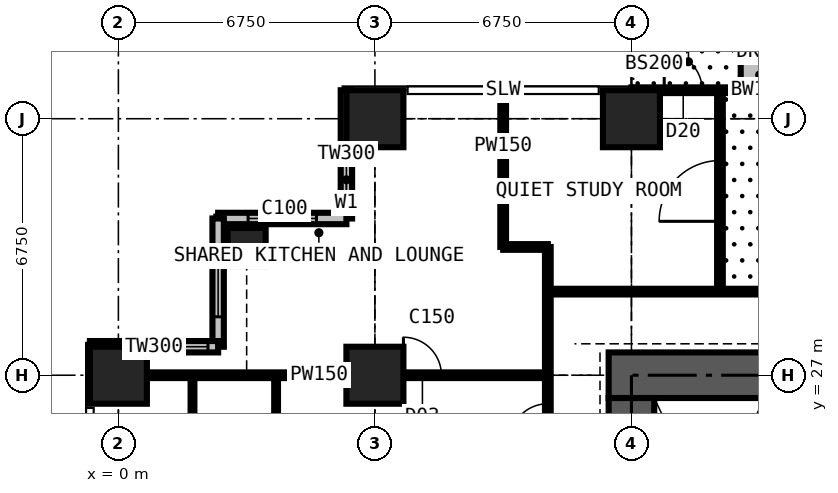
"""IFC4 building model, lengths in metres.
Left out: names, types, materials, properties, quantities, classifications, styles, units other than length and angle.
Written with IfcOpenShell. Run it as: python <this file> out.ifc"""

import sys

from ifc_helpers import new_model, si_unit, direction, frame, frame_2d, origin, origin_2d, place, context, subcontext, project, spatial, rectangle, extrude, element, fill, save


model = new_model("IFC4")
c1 = context("Model", 3, precision=1e-05, world=origin(), true_north=direction((0.0, 1.0)))
c2 = subcontext(c1, "Body", "Model", "MODEL_VIEW")
j1 = project(units=[si_unit("LENGTHUNIT", "METRE"), si_unit("PLANEANGLEUNIT", "RADIAN")], contexts=[c1])
p1 = place(None, origin())
s1 = spatial("IfcSite", under=j1, at=p1, CompositionType="ELEMENT")
p2 = place(p1, origin())
s2 = spatial("IfcBuilding", under=s1, at=p2, CompositionType="ELEMENT")
p3 = place(p2, frame((0.0, 0.0, 108.9)))
s3 = spatial("IfcBuildingStorey", under=s2, at=p3, CompositionType="ELEMENT", Elevation=108.9)
p4 = place(p3, frame((0.0, 27.0, 0.0), z_axis=(0.0, 0.0, 1.0), x_axis=(1.0, 0.0, 0.0)))
e1 = element("IfcColumn", 1, at=p4, inside=s3, PredefinedType="COLUMN", context=c2, shape_type="SweptSolid", body=[
    extrude(rectangle(XDim=1.5, YDim=1.5, at=origin_2d()), origin(), (0.0, 0.0, 1.0), 3.6),
])
p5 = place(p3, frame((3.375, 30.375, 0.0), z_axis=(0.0, 0.0, 1.0), x_axis=(1.0, 0.0, 0.0)))
e2 = element("IfcColumn", 2, at=p5, inside=s3, PredefinedType="COLUMN", context=c2, shape_type="SweptSolid", body=[
    extrude(rectangle(XDim=1.0, YDim=1.0, at=origin_2d()), origin(), (0.0, 0.0, 1.0), 3.6),
])
for number, where, z_axis, x_axis in (
    (3, (6.75, 27.0, 0.0), (0.0, 0.0, 1.0), (1.0, 0.0, 0.0)),
    (4, (6.75, 33.75, 0.0), (0.0, 0.0, 1.0), (1.0, 0.0, 0.0)),
    (5, (13.5, 33.75, 0.0), (0.0, 0.0, 1.0), (1.0, 0.0, 0.0)),
):
    element("IfcColumn", number, at=place(p3, frame(where, z_axis=z_axis, x_axis=x_axis)), inside=s3, PredefinedType="COLUMN", context=c2, shape_type="SweptSolid", body=[
        extrude(rectangle(XDim=1.5, YDim=1.5, at=origin_2d()), origin(), (0.0, 0.0, 1.0), 3.6),
    ])
p6 = place(p3, frame((27.6, 27.0, 0.0), z_axis=(0.0, 0.0, 1.0), x_axis=(-1.0, 0.0, 0.0)))
e6 = element("IfcWall", 6, at=p6, inside=s3, PredefinedType="SHEAR", context=c2, shape_type="SweptSolid", body=[
    extrude(rectangle(XDim=14.7, YDim=1.2, at=frame_2d((7.35, 0.0))), origin(), (0.0, 0.0, 1.0), 3.6),
])
p7 = place(p6, frame((4.55, 0.0, 0.0)))
e7 = element("IfcOpeningElement", 7, at=p7, cuts=e6, PredefinedType="OPENING", context=c2, shape_type="SweptSolid", body=[
    extrude(rectangle(XDim=0.9, YDim=2.2, at=frame_2d((0.45, 1.1))), frame((0.0, 0.61, 0.0), z_axis=(0.0, -1.0, 0.0), x_axis=(1.0, 0.0, 0.0)), (0.0, 0.0, 1.0), 1.22),
])
p8 = place(p6, frame((7.525, 0.0, 0.0)))
e8 = element("IfcOpeningElement", 8, at=p8, cuts=e6, PredefinedType="OPENING", context=c2, shape_type="SweptSolid", body=[
    extrude(rectangle(XDim=1.0, YDim=2.2, at=frame_2d((0.5, 1.1))), frame((0.0, 0.61, 0.0), z_axis=(0.0, -1.0, 0.0), x_axis=(1.0, 0.0, 0.0)), (0.0, 0.0, 1.0), 1.22),
])
p9 = place(p3, frame((13.5, 26.4, 0.0), z_axis=(0.0, 0.0, 1.0), x_axis=(0.0, -1.0, 0.0)))
e9 = element("IfcWall", 9, at=p9, inside=s3, PredefinedType="SHEAR", context=c2, shape_type="SweptSolid", body=[
    extrude(rectangle(XDim=12.3, YDim=1.2, at=frame_2d((6.15, 0.0))), origin(), (0.0, 0.0, 1.0), 3.6),
])
p10 = place(p9, frame((7.45, 0.0, 0.0)))
e10 = element("IfcOpeningElement", 10, at=p10, cuts=e9, PredefinedType="OPENING", context=c2, shape_type="SweptSolid", body=[
    extrude(rectangle(XDim=1.2, YDim=2.2, at=frame_2d((0.6, 1.1))), frame((0.0, 0.61, 0.0), z_axis=(0.0, -1.0, 0.0), x_axis=(1.0, 0.0, 0.0)), (0.0, 0.0, 1.0), 1.22),
])
p11 = place(p3, frame((13.5, 34.5, 0.0), z_axis=(0.0, 0.0, 1.0), x_axis=(1.0, 0.0, 0.0)))
e11 = element("IfcWall", 11, at=p11, inside=s3, PredefinedType="SOLIDWALL", context=c2, shape_type="SweptSolid", body=[
    extrude(rectangle(XDim=6.75, YDim=0.15, at=frame_2d((3.375, 0.0))), origin(), (0.0, 0.0, 1.0), 3.375),
])
p12 = place(p11, frame((0.863, 0.0, 0.0)))
e12 = element("IfcOpeningElement", 12, at=p12, cuts=e11, PredefinedType="OPENING", context=c2, shape_type="SweptSolid", body=[
    extrude(rectangle(XDim=1.0, YDim=2.2, at=frame_2d((0.5, 1.1))), frame((0.0, 0.085, 0.0), z_axis=(0.0, -1.0, 0.0), x_axis=(1.0, 0.0, 0.0)), (0.0, 0.0, 1.0), 0.17),
])
p13 = place(p11, frame((2.512, 0.0, 0.9)))
e13 = element("IfcOpeningElement", 13, at=p13, cuts=e11, PredefinedType="OPENING", context=c2, shape_type="SweptSolid", body=[
    extrude(rectangle(XDim=0.9, YDim=1.8, at=frame_2d((0.45, 0.9))), frame((0.0, 0.085, 0.0), z_axis=(0.0, -1.0, 0.0), x_axis=(1.0, 0.0, 0.0)), (0.0, 0.0, 1.0), 0.17),
])
p14 = place(p11, frame((4.887, 0.0, 0.0)))
e14 = element("IfcOpeningElement", 14, at=p14, cuts=e11, PredefinedType="OPENING", context=c2, shape_type="SweptSolid", body=[
    extrude(rectangle(XDim=1.0, YDim=2.2, at=frame_2d((0.5, 1.1))), frame((0.0, 0.085, 0.0), z_axis=(0.0, -1.0, 0.0), x_axis=(1.0, 0.0, 0.0)), (0.0, 0.0, 1.0), 0.17),
])
p15 = place(p11, frame((3.575, 0.0, 0.9)))
e15 = element("IfcOpeningElement", 15, at=p15, cuts=e11, PredefinedType="OPENING", context=c2, shape_type="SweptSolid", body=[
    extrude(rectangle(XDim=1.2, YDim=1.8, at=frame_2d((0.6, 0.9))), frame((0.0, 0.085, 0.0), z_axis=(0.0, -1.0, 0.0), x_axis=(1.0, 0.0, 0.0)), (0.0, 0.0, 1.0), 0.17),
])
p16 = place(p3, frame((6.0, 34.5, 0.0), z_axis=(0.0, 0.0, 1.0), x_axis=(0.0, -1.0, 0.0)))
e16 = element("IfcWall", 16, at=p16, inside=s3, PredefinedType="SOLIDWALL", context=c2, shape_type="SweptSolid", body=[
    extrude(rectangle(XDim=3.375, YDim=0.3, at=frame_2d((1.688, 0.0))), origin(), (0.0, 0.0, 1.0), 3.375),
])
p17 = place(p16, frame((1.607, 0.0, 0.9)))
e17 = element("IfcOpeningElement", 17, at=p17, cuts=e16, PredefinedType="OPENING", context=c2, shape_type="SweptSolid", body=[
    extrude(rectangle(XDim=1.5, YDim=1.8, at=frame_2d((0.75, 0.9))), frame((0.0, 0.16, 0.0), z_axis=(0.0, -1.0, 0.0), x_axis=(1.0, 0.0, 0.0)), (0.0, 0.0, 1.0), 0.32),
])
p18 = place(p3, frame((6.0, 31.125, 0.0), z_axis=(0.0, 0.0, 1.0), x_axis=(-1.0, 0.0, 0.0)))
e18 = element("IfcWall", 18, at=p18, inside=s3, PredefinedType="SOLIDWALL", context=c2, shape_type="SweptSolid", body=[
    extrude(rectangle(XDim=3.375, YDim=0.3, at=frame_2d((1.688, 0.0))), origin(), (0.0, 0.0, 1.0), 3.375),
])
p19 = place(p18, frame((0.788, 0.0, 0.6)))
e19 = element("IfcOpeningElement", 19, at=p19, cuts=e18, PredefinedType="OPENING", context=c2, shape_type="SweptSolid", body=[
    extrude(rectangle(XDim=1.8, YDim=2.1, at=frame_2d((0.9, 1.05))), frame((0.0, 0.16, 0.0), z_axis=(0.0, -1.0, 0.0), x_axis=(1.0, 0.0, 0.0)), (0.0, 0.0, 1.0), 0.32),
])
p20 = place(p3, frame((2.625, 31.125, 0.0), z_axis=(0.0, 0.0, 1.0), x_axis=(0.0, -1.0, 0.0)))
e20 = element("IfcWall", 20, at=p20, inside=s3, PredefinedType="SOLIDWALL", context=c2, shape_type="SweptSolid", body=[
    extrude(rectangle(XDim=3.375, YDim=0.3, at=frame_2d((1.688, 0.0))), origin(), (0.0, 0.0, 1.0), 3.375),
])
p21 = place(p20, frame((0.788, 0.0, 0.6)))
e21 = element("IfcOpeningElement", 21, at=p21, cuts=e20, PredefinedType="OPENING", context=c2, shape_type="SweptSolid", body=[
    extrude(rectangle(XDim=1.8, YDim=2.1, at=frame_2d((0.9, 1.05))), frame((0.0, 0.16, 0.0), z_axis=(0.0, -1.0, 0.0), x_axis=(1.0, 0.0, 0.0)), (0.0, 0.0, 1.0), 0.32),
])
p22 = place(p3, frame((2.625, 27.75, 0.0), z_axis=(0.0, 0.0, 1.0), x_axis=(-1.0, 0.0, 0.0)))
e22 = element("IfcWall", 22, at=p22, inside=s3, PredefinedType="SOLIDWALL", context=c2, shape_type="SweptSolid", body=[
    extrude(rectangle(XDim=3.375, YDim=0.3, at=frame_2d((1.688, 0.0))), origin(), (0.0, 0.0, 1.0), 3.375),
])
p23 = place(p22, frame((0.268, 0.0, 0.9)))
e23 = element("IfcOpeningElement", 23, at=p23, cuts=e22, PredefinedType="OPENING", context=c2, shape_type="SweptSolid", body=[
    extrude(rectangle(XDim=1.5, YDim=1.8, at=frame_2d((0.75, 0.9))), frame((0.0, 0.16, 0.0), z_axis=(0.0, -1.0, 0.0), x_axis=(1.0, 0.0, 0.0)), (0.0, 0.0, 1.0), 0.32),
])
p24 = place(p3, frame((16.875, 34.6, 0.0), z_axis=(0.0, 0.0, 1.0), x_axis=(0.0, 1.0, 0.0)))
e24 = element("IfcWall", 24, at=p24, inside=s3, PredefinedType="USERDEFINED", context=c2, shape_type="SweptSolid", body=[
    extrude(rectangle(XDim=2.2, YDim=1.0, at=frame_2d((1.1, 0.0))), origin(), (0.0, 0.0, 1.0), 0.9),
])
p25 = place(p3, frame((-0.734, 27.0, 0.0), z_axis=(0.0, 0.0, 1.0), x_axis=(1.0, 0.0, 0.0)))
e25 = element("IfcWall", 25, at=p25, inside=s3, PredefinedType="PARTITIONING", context=c2, shape_type="SweptSolid", body=[
    extrude(rectangle(XDim=12.034, YDim=0.15, at=frame_2d((6.017, 0.0))), origin(), (0.0, 0.0, 1.0), 2.806),
])
p26 = place(p25, frame((8.234, 0.0, 0.0)))
e26 = element("IfcOpeningElement", 26, at=p26, cuts=e25, PredefinedType="OPENING", context=c2, shape_type="SweptSolid", body=[
    extrude(rectangle(XDim=1.0, YDim=2.2, at=frame_2d((0.5, 1.1))), frame((0.0, 0.085, 0.0), z_axis=(0.0, -1.0, 0.0), x_axis=(1.0, 0.0, 0.0)), (0.0, 0.0, 1.0), 0.17),
])
p27 = place(p3, frame((1.95, 25.0, 0.0), z_axis=(0.0, 0.0, 1.0), x_axis=(0.0, 1.0, 0.0)))
e27 = element("IfcWall", 27, at=p27, inside=s3, PredefinedType="PARTITIONING", context=c2, shape_type="SweptSolid", body=[
    extrude(rectangle(XDim=2.0, YDim=0.1, at=frame_2d((1.0, 0.0))), origin(), (0.0, 0.0, 1.0), 3.375),
])
p28 = place(p3, frame((4.15, 10.125, 0.0), z_axis=(0.0, 0.0, 1.0), x_axis=(0.0, 1.0, 0.0)))
e28 = element("IfcWall", 28, at=p28, inside=s3, PredefinedType="PARTITIONING", context=c2, shape_type="SweptSolid", body=[
    extrude(rectangle(XDim=16.875, YDim=0.1, at=frame_2d((8.438, 0.0))), origin(), (0.0, 0.0, 1.0), 3.375),
])
p29 = place(p28, frame((0.2, 0.0, 0.0)))
e29 = element("IfcOpeningElement", 29, at=p29, cuts=e28, PredefinedType="OPENING", context=c2, shape_type="SweptSolid", body=[
    extrude(rectangle(XDim=0.95, YDim=2.2, at=frame_2d((0.475, 1.1))), frame((0.0, 0.06, 0.0), z_axis=(0.0, -1.0, 0.0), x_axis=(1.0, 0.0, 0.0)), (0.0, 0.0, 1.0), 0.12),
])
p30 = place(p28, frame((3.625, 0.0, 0.0)))
e30 = element("IfcOpeningElement", 30, at=p30, cuts=e28, PredefinedType="OPENING", context=c2, shape_type="SweptSolid", body=[
    extrude(rectangle(XDim=0.95, YDim=2.2, at=frame_2d((0.475, 1.1))), frame((0.0, 0.06, 0.0), z_axis=(0.0, -1.0, 0.0), x_axis=(1.0, 0.0, 0.0)), (0.0, 0.0, 1.0), 0.12),
])
p31 = place(p28, frame((7.0, 0.0, 0.0)))
e31 = element("IfcOpeningElement", 31, at=p31, cuts=e28, PredefinedType="OPENING", context=c2, shape_type="SweptSolid", body=[
    extrude(rectangle(XDim=0.95, YDim=2.2, at=frame_2d((0.475, 1.1))), frame((0.0, 0.06, 0.0), z_axis=(0.0, -1.0, 0.0), x_axis=(1.0, 0.0, 0.0)), (0.0, 0.0, 1.0), 0.12),
])
p32 = place(p28, frame((10.375, 0.0, 0.0)))
e32 = element("IfcOpeningElement", 32, at=p32, cuts=e28, PredefinedType="OPENING", context=c2, shape_type="SweptSolid", body=[
    extrude(rectangle(XDim=0.95, YDim=2.2, at=frame_2d((0.475, 1.1))), frame((0.0, 0.06, 0.0), z_axis=(0.0, -1.0, 0.0), x_axis=(1.0, 0.0, 0.0)), (0.0, 0.0, 1.0), 0.12),
])
p33 = place(p28, frame((13.75, 0.0, 0.0)))
e33 = element("IfcOpeningElement", 33, at=p33, cuts=e28, PredefinedType="OPENING", context=c2, shape_type="SweptSolid", body=[
    extrude(rectangle(XDim=0.95, YDim=2.2, at=frame_2d((0.475, 1.1))), frame((0.0, 0.06, 0.0), z_axis=(0.0, -1.0, 0.0), x_axis=(1.0, 0.0, 0.0)), (0.0, 0.0, 1.0), 0.12),
])
p34 = place(p3, frame((10.125, 30.375, 0.0), z_axis=(0.0, 0.0, 1.0), x_axis=(0.0, 1.0, 0.0)))
e34 = element("IfcWall", 34, at=p34, inside=s3, PredefinedType="PARTITIONING", context=c2, shape_type="SweptSolid", body=[
    extrude(rectangle(XDim=4.109, YDim=0.15, at=frame_2d((2.054, 0.0))), origin(), (0.0, 0.0, 1.0), 3.375),
])
p35 = place(p3, frame((10.125, 30.375, 0.0), z_axis=(0.0, 0.0, 1.0), x_axis=(1.0, 0.0, 0.0)))
e35 = element("IfcWall", 35, at=p35, inside=s3, PredefinedType="PARTITIONING", context=c2, shape_type="SweptSolid", body=[
    extrude(rectangle(XDim=1.175, YDim=0.15, at=frame_2d((0.587, 0.0))), origin(), (0.0, 0.0, 1.0), 3.375),
])
p36 = place(p3, frame((11.3, 11.3, 0.0), z_axis=(0.0, 0.0, 1.0), x_axis=(0.0, 1.0, 0.0)))
e36 = element("IfcWall", 36, at=p36, inside=s3, PredefinedType="PARTITIONING", context=c2, shape_type="SweptSolid", body=[
    extrude(rectangle(XDim=19.075, YDim=0.15, at=frame_2d((9.538, 0.0))), origin(), (0.0, 0.0, 1.0), 3.375),
])
p37 = place(p36, frame((13.95, 0.0, 0.0)))
e37 = element("IfcOpeningElement", 37, at=p37, cuts=e36, PredefinedType="OPENING", context=c2, shape_type="SweptSolid", body=[
    extrude(rectangle(XDim=1.0, YDim=2.2, at=frame_2d((0.5, 1.1))), frame((0.0, 0.085, 0.0), z_axis=(0.0, -1.0, 0.0), x_axis=(1.0, 0.0, 0.0)), (0.0, 0.0, 1.0), 0.17),
])
p38 = place(p3, frame((11.3, 29.2, 0.0), z_axis=(0.0, 0.0, 1.0), x_axis=(1.0, 0.0, 0.0)))
e38 = element("IfcWall", 38, at=p38, inside=s3, PredefinedType="PARTITIONING", context=c2, shape_type="SweptSolid", body=[
    extrude(rectangle(XDim=19.075, YDim=0.15, at=frame_2d((9.538, 0.0))), origin(), (0.0, 0.0, 1.0), 3.375),
])
p39 = place(p38, frame((14.25, 0.0, 0.0)))
e39 = element("IfcOpeningElement", 39, at=p39, cuts=e38, PredefinedType="OPENING", context=c2, shape_type="SweptSolid", body=[
    extrude(rectangle(XDim=1.0, YDim=2.2, at=frame_2d((0.5, 1.1))), frame((0.0, 0.085, 0.0), z_axis=(0.0, -1.0, 0.0), x_axis=(1.0, 0.0, 0.0)), (0.0, 0.0, 1.0), 0.17),
])
p40 = place(p38, frame((16.35, 0.0, 0.0)))
e40 = element("IfcOpeningElement", 40, at=p40, cuts=e38, PredefinedType="OPENING", context=c2, shape_type="SweptSolid", body=[
    extrude(rectangle(XDim=1.0, YDim=2.2, at=frame_2d((0.5, 1.1))), frame((0.0, 0.085, 0.0), z_axis=(0.0, -1.0, 0.0), x_axis=(1.0, 0.0, 0.0)), (0.0, 0.0, 1.0), 0.17),
])
p41 = place(p38, frame((8.379, 0.0, 0.0)))
e41 = element("IfcOpeningElement", 41, at=p41, cuts=e38, PredefinedType="OPENING", context=c2, shape_type="SweptSolid", body=[
    extrude(rectangle(XDim=1.5, YDim=2.2, at=frame_2d((0.75, 1.1))), frame((0.0, 0.085, 0.0), z_axis=(0.0, -1.0, 0.0), x_axis=(1.0, 0.0, 0.0)), (0.0, 0.0, 1.0), 0.17),
])
p42 = place(p3, frame((15.829, 29.2, 0.0), z_axis=(0.0, 0.0, 1.0), x_axis=(0.0, 1.0, 0.0)))
e42 = element("IfcWall", 42, at=p42, inside=s3, PredefinedType="PARTITIONING", context=c2, shape_type="SweptSolid", body=[
    extrude(rectangle(XDim=5.284, YDim=0.15, at=frame_2d((2.642, 0.0))), origin(), (0.0, 0.0, 1.0), 3.375),
])
p43 = place(p42, frame((1.85, 0.0, 0.0)))
e43 = element("IfcOpeningElement", 43, at=p43, cuts=e42, PredefinedType="OPENING", context=c2, shape_type="SweptSolid", body=[
    extrude(rectangle(XDim=1.6, YDim=2.4, at=frame_2d((0.8, 1.2))), frame((0.0, 0.085, 0.0), z_axis=(0.0, -1.0, 0.0), x_axis=(1.0, 0.0, 0.0)), (0.0, 0.0, 1.0), 0.17),
])
p44 = place(p12, origin())
e44 = element("IfcDoor", 44, at=p44, inside=s3, OperationType="SINGLE_SWING_LEFT", PredefinedType="DOOR", context=c2, shape_type="SweptSolid", body=[
    extrude(rectangle(XDim=1.0, YDim=2.2, at=frame_2d((0.5, 1.1))), frame((0.0, 0.025, 0.0), z_axis=(0.0, -1.0, 0.0), x_axis=(1.0, 0.0, 0.0)), (0.0, 0.0, 1.0), 0.05),
])
fill(e12, e44)
p45 = place(p13, origin())
e45 = element("IfcWindow", 45, at=p45, inside=s3, PartitioningType="SINGLE_PANEL", PredefinedType="WINDOW", context=c2, shape_type="SweptSolid", body=[
    extrude(rectangle(XDim=0.9, YDim=1.8, at=frame_2d((0.45, 0.9))), frame((0.0, 0.03, 0.0), z_axis=(0.0, -1.0, 0.0), x_axis=(1.0, 0.0, 0.0)), (0.0, 0.0, 1.0), 0.06),
])
fill(e13, e45)
p46 = place(p17, origin())
e46 = element("IfcWindow", 46, at=p46, inside=s3, PartitioningType="SINGLE_PANEL", PredefinedType="WINDOW", context=c2, shape_type="SweptSolid", body=[
    extrude(rectangle(XDim=1.5, YDim=1.8, at=frame_2d((0.75, 0.9))), frame((0.0, 0.03, 0.0), z_axis=(0.0, -1.0, 0.0), x_axis=(1.0, 0.0, 0.0)), (0.0, 0.0, 1.0), 0.06),
])
fill(e17, e46)
p47 = place(p19, origin())
e47 = element("IfcWindow", 47, at=p47, inside=s3, PartitioningType="SINGLE_PANEL", PredefinedType="WINDOW", context=c2, shape_type="SweptSolid", body=[
    extrude(rectangle(XDim=1.8, YDim=2.1, at=frame_2d((0.9, 1.05))), frame((0.0, 0.03, 0.0), z_axis=(0.0, -1.0, 0.0), x_axis=(1.0, 0.0, 0.0)), (0.0, 0.0, 1.0), 0.06),
])
fill(e19, e47)
p48 = place(p21, origin())
e48 = element("IfcWindow", 48, at=p48, inside=s3, PartitioningType="SINGLE_PANEL", PredefinedType="WINDOW", context=c2, shape_type="SweptSolid", body=[
    extrude(rectangle(XDim=1.8, YDim=2.1, at=frame_2d((0.9, 1.05))), frame((0.0, 0.03, 0.0), z_axis=(0.0, -1.0, 0.0), x_axis=(1.0, 0.0, 0.0)), (0.0, 0.0, 1.0), 0.06),
])
fill(e21, e48)
p49 = place(p23, origin())
e49 = element("IfcWindow", 49, at=p49, inside=s3, PartitioningType="SINGLE_PANEL", PredefinedType="WINDOW", context=c2, shape_type="SweptSolid", body=[
    extrude(rectangle(XDim=1.5, YDim=1.8, at=frame_2d((0.75, 0.9))), frame((0.0, 0.03, 0.0), z_axis=(0.0, -1.0, 0.0), x_axis=(1.0, 0.0, 0.0)), (0.0, 0.0, 1.0), 0.06),
])
fill(e23, e49)
p50 = place(p43, origin())
e50 = element("IfcDoor", 50, at=p50, inside=s3, OperationType="DOUBLE_DOOR_SINGLE_SWING", PredefinedType="DOOR", context=c2, shape_type="SweptSolid", body=[
    extrude(rectangle(XDim=1.6, YDim=2.4, at=frame_2d((0.8, 1.2))), frame((0.0, 0.025, 0.0), z_axis=(0.0, -1.0, 0.0), x_axis=(1.0, 0.0, 0.0)), (0.0, 0.0, 1.0), 0.05),
])
fill(e43, e50)
p51 = place(p26, origin())
e51 = element("IfcDoor", 51, at=p51, inside=s3, OperationType="SINGLE_SWING_LEFT", PredefinedType="DOOR", context=c2, shape_type="SweptSolid", body=[
    extrude(rectangle(XDim=1.0, YDim=2.2, at=frame_2d((0.5, 1.1))), frame((0.0, 0.025, 0.0), z_axis=(0.0, -1.0, 0.0), x_axis=(1.0, 0.0, 0.0)), (0.0, 0.0, 1.0), 0.05),
])
fill(e26, e51)
p52 = place(p37, origin())
e52 = element("IfcDoor", 52, at=p52, inside=s3, OperationType="SINGLE_SWING_LEFT", PredefinedType="DOOR", context=c2, shape_type="SweptSolid", body=[
    extrude(rectangle(XDim=1.0, YDim=2.2, at=frame_2d((0.5, 1.1))), frame((0.0, 0.025, 0.0), z_axis=(0.0, -1.0, 0.0), x_axis=(1.0, 0.0, 0.0)), (0.0, 0.0, 1.0), 0.05),
])
fill(e37, e52)
save(model, sys.argv[1])
